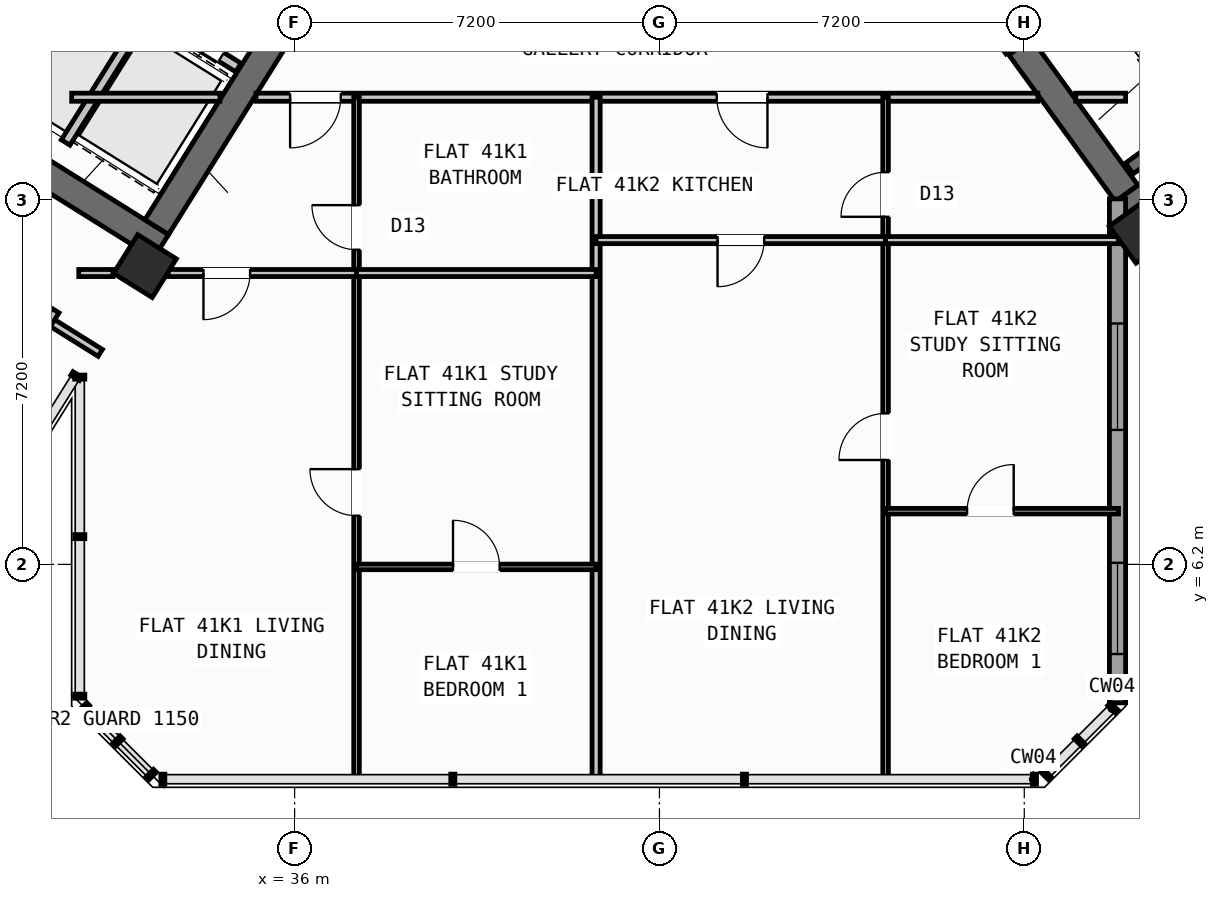
"""IFC4 building model, lengths in metres.
Left out: names, types, materials, properties, quantities, classifications, styles, units other than length and angle.
Written with IfcOpenShell. Run it as: python <this file> out.ifc"""

import sys

from ifc_helpers import new_model, si_unit, direction, frame, frame_2d, origin, origin_2d, place, context, subcontext, project, spatial, rectangle, hollow_rectangle, extrude, source, transform, mapped, element, fill, save


model = new_model("IFC4")
c1 = context("Model", 3, precision=1e-05, world=origin(), true_north=direction((0.0, 1.0)))
c2 = subcontext(c1, "Body", "Model", "MODEL_VIEW")
j1 = project(units=[si_unit("LENGTHUNIT", "METRE"), si_unit("PLANEANGLEUNIT", "RADIAN")], contexts=[c1])
p1 = place(None, origin())
s1 = spatial("IfcSite", under=j1, at=p1, CompositionType="ELEMENT")
p2 = place(p1, origin())
s2 = spatial("IfcBuilding", under=s1, at=p2, CompositionType="ELEMENT")
p3 = place(p2, frame((0.0, 0.0, 162.3)))
s3 = spatial("IfcBuildingStorey", under=s2, at=p3, CompositionType="ELEMENT", Elevation=162.3)
p4 = place(p3, frame((33.366, 12.477, 0.0), z_axis=(0.0, 0.0, 1.0), x_axis=(-0.848047359947, 0.529920442413, 0.0)))
e1 = element("IfcWall", 1, at=p4, inside=s3, PredefinedType="SHEAR", context=c2, shape_type="SweptSolid", body=[
    extrude(rectangle(XDim=13.14, YDim=0.55, at=frame_2d((6.57, 0.0))), origin(), (0.0, 0.0, 1.0), 3.35),
])
p5 = place(p3, frame((36.683, 18.304, 0.0), z_axis=(0.0, 0.0, 1.0), x_axis=(-0.529896466841, -0.848062341122, 0.0)))
e2 = element("IfcWall", 2, at=p5, inside=s3, PredefinedType="SHEAR", context=c2, shape_type="SweptSolid", body=[
    extrude(rectangle(XDim=6.425, YDim=0.55, at=frame_2d((3.212, 0.0))), origin(), (0.0, 0.0, 1.0), 3.35),
])
p6 = place(p3, frame((52.359, 13.14, 0.0), z_axis=(0.0, 0.0, 1.0), x_axis=(0.809014896919, 0.587788139183, 0.0)))
e3 = element("IfcWall", 3, at=p6, inside=s3, PredefinedType="SHEAR", context=c2, shape_type="SweptSolid", body=[
    extrude(rectangle(XDim=12.34, YDim=0.55, at=frame_2d((6.17, 0.0))), origin(), (0.0, 0.0, 1.0), 3.35),
])
p7 = place(p3, frame((52.42, 13.524, 0.0), z_axis=(0.0, 0.0, 1.0), x_axis=(-0.587802113096, 0.809004744015, 0.0)))
e4 = element("IfcWall", 4, at=p7, inside=s3, PredefinedType="SHEAR", context=c2, shape_type="SweptSolid", body=[
    extrude(rectangle(XDim=3.575, YDim=0.55, at=frame_2d((1.788, 0.0))), origin(), (0.0, 0.0, 1.0), 3.35),
])
m1 = source(origin(), c2, "Body", "SweptSolid", [
    extrude(hollow_rectangle(XDim=0.9, YDim=0.9, WallThickness=0.036, at=origin_2d()), origin(), (0.0, 0.0, 1.0), 3.6),
])
for number, where, z_axis, x_axis in (
    (5, (33.046, 12.087, 0.0), (0.0, 0.0, 1.0), (-0.848, 0.53, 0.0)),
    (6, (52.705, 12.773, 0.0), (0.0, 0.0, 1.0), (0.809, 0.588, 0.0)),
):
    element("IfcColumn", number, at=place(p3, frame(where, z_axis=z_axis, x_axis=x_axis)), inside=s3, PredefinedType="COLUMN", context=c2, shape_type="MappedRepresentation", body=[
        mapped(m1, transform((0.0, 0.0, 0.0), scale=1.0)),
    ])
p8 = place(p3, frame((56.581, 7.439, 0.0), z_axis=(0.0, 0.0, 1.0), x_axis=(-0.587771678454, 0.809026856172, 0.0)))
e7 = element("IfcWall", 7, at=p8, inside=s3, PredefinedType="STANDARD", context=c2, shape_type="SweptSolid", body=[
    extrude(rectangle(XDim=6.824, YDim=0.32, at=frame_2d((3.412, 0.0))), origin(), (0.0, 0.0, 1.0), 2.775),
])
p9 = place(p8, frame((1.531, 0.0, 0.8)))
e8 = element("IfcOpeningElement", 8, at=p9, cuts=e7, PredefinedType="OPENING", context=c2, shape_type="SweptSolid", body=[
    extrude(rectangle(XDim=2.1, YDim=1.55, at=frame_2d((1.05, 0.775))), frame((0.0, 0.17, 0.0), z_axis=(0.0, -1.0, 0.0), x_axis=(1.0, 0.0, 0.0)), (0.0, 0.0, 1.0), 0.34),
])
p10 = place(p3, frame((52.24, 13.414, 0.0), z_axis=(0.0, 0.0, 1.0), x_axis=(0.0, -1.0, 0.0)))
e9 = element("IfcWall", 9, at=p10, inside=s3, PredefinedType="STANDARD", context=c2, shape_type="SweptSolid", body=[
    extrude(rectangle(XDim=9.948, YDim=0.32, at=frame_2d((4.974, 0.0))), origin(), (0.0, 0.0, 1.0), 3.35),
])
p11 = place(p10, frame((2.46, 0.0, 0.8)))
e10 = element("IfcOpeningElement", 10, at=p11, cuts=e9, PredefinedType="OPENING", context=c2, shape_type="SweptSolid", body=[
    extrude(rectangle(XDim=2.1, YDim=1.55, at=frame_2d((1.05, 0.775))), frame((0.0, 0.17, 0.0), z_axis=(0.0, -1.0, 0.0), x_axis=(1.0, 0.0, 0.0)), (0.0, 0.0, 1.0), 0.34),
])
p12 = place(p10, frame((7.183, 0.0, 0.85)))
e11 = element("IfcOpeningElement", 11, at=p12, cuts=e9, PredefinedType="OPENING", context=c2, shape_type="SweptSolid", body=[
    extrude(rectangle(XDim=1.8, YDim=1.5, at=frame_2d((0.9, 0.75))), frame((0.0, 0.17, 0.0), z_axis=(0.0, -1.0, 0.0), x_axis=(1.0, 0.0, 0.0)), (0.0, 0.0, 1.0), 0.34),
])
p13 = place(p3, frame((31.288, 18.256, 0.0), z_axis=(0.0, 0.0, 1.0), x_axis=(-0.529943379326, -0.848033026897, 0.0)))
e12 = element("IfcWall", 12, at=p13, inside=s3, PredefinedType="SHEAR", context=c2, shape_type="SweptSolid", body=[
    extrude(rectangle(XDim=3.16, YDim=0.26, at=frame_2d((1.58, 0.0))), origin(), (0.0, 0.0, 1.0), 3.35),
])
p14 = place(p3, frame((34.891, 16.005, 0.0), z_axis=(0.0, 0.0, 1.0), x_axis=(-0.848062873452, 0.529895614884, 0.0)))
e13 = element("IfcWall", 13, at=p14, inside=s3, PredefinedType="STANDARD", context=c2, shape_type="SweptSolid", body=[
    extrude(rectangle(XDim=4.248, YDim=0.2, at=frame_2d((2.124, 0.0))), origin(), (0.0, 0.0, 1.0), 3.34),
])
p15 = place(p14, frame((0.398, 0.0, 0.0)))
e14 = element("IfcOpeningElement", 14, at=p15, cuts=e13, PredefinedType="OPENING", context=c2, shape_type="SweptSolid", body=[
    extrude(rectangle(XDim=1.3, YDim=2.2, at=frame_2d((0.65, 1.1))), frame((0.0, 0.11, 0.0), z_axis=(0.0, -1.0, 0.0), x_axis=(1.0, 0.0, 0.0)), (0.0, 0.0, 1.0), 0.22),
])
p16 = place(p14, frame((2.473, 0.0, 0.0)))
e15 = element("IfcOpeningElement", 15, at=p16, cuts=e13, PredefinedType="OPENING", context=c2, shape_type="SweptSolid", body=[
    extrude(rectangle(XDim=1.45, YDim=2.25, at=frame_2d((0.725, 1.125))), frame((0.0, 0.11, 0.0), z_axis=(0.0, -1.0, 0.0), x_axis=(1.0, 0.0, 0.0)), (0.0, 0.0, 1.0), 0.22),
])
p17 = place(p3, frame((33.029, 17.003, 0.0), z_axis=(0.0, 0.0, 1.0), x_axis=(-0.529916267533, -0.848049968695, 0.0)))
e16 = element("IfcWall", 16, at=p17, inside=s3, PredefinedType="STANDARD", context=c2, shape_type="SweptSolid", body=[
    extrude(rectangle(XDim=2.92, YDim=0.2, at=frame_2d((1.46, 0.0))), origin(), (0.0, 0.0, 1.0), 3.34),
])
p18 = place(p3, frame((52.472, 14.013, 0.0), z_axis=(0.0, 0.0, 1.0), x_axis=(0.809028366311, 0.587769599847, 0.0)))
e17 = element("IfcWall", 17, at=p18, inside=s3, PredefinedType="SHEAR", context=c2, shape_type="SweptSolid", body=[
    extrude(rectangle(XDim=7.33, YDim=0.26, at=frame_2d((3.665, 0.0))), origin(), (0.0, 0.0, 1.0), 3.35),
])
p19 = place(p3, frame((32.164, 10.374, 0.0), z_axis=(0.0, 0.0, 1.0), x_axis=(-0.848044107957, 0.529925646633, 0.0)))
e18 = element("IfcWall", 18, at=p19, inside=s3, PredefinedType="PARTITIONING", context=c2, shape_type="SweptSolid", body=[
    extrude(rectangle(XDim=15.57, YDim=0.16, at=frame_2d((7.785, 0.0))), origin(), (0.0, 0.0, 1.0), 3.34),
])
p20 = place(p19, frame((10.83, 0.0, 0.0)))
e19 = element("IfcOpeningElement", 19, at=p20, cuts=e18, PredefinedType="OPENING", context=c2, shape_type="SweptSolid", body=[
    extrude(rectangle(XDim=1.0, YDim=2.1, at=frame_2d((0.5, 1.05))), frame((0.0, 0.09, 0.0), z_axis=(0.0, -1.0, 0.0), x_axis=(1.0, 0.0, 0.0)), (0.0, 0.0, 1.0), 0.18),
])
p21 = place(p3, frame((31.282, 11.208, 0.0), z_axis=(0.0, 0.0, 1.0), x_axis=(-0.529938869374, -0.84803584519, 0.0)))
e20 = element("IfcWall", 20, at=p21, inside=s3, PredefinedType="PARTITIONING", context=c2, shape_type="SweptSolid", body=[
    extrude(rectangle(XDim=5.48, YDim=0.16, at=frame_2d((2.74, 0.0))), origin(), (0.0, 0.0, 1.0), 3.34),
])
p22 = place(p3, frame((31.6, 15.42, 0.0), z_axis=(0.0, 0.0, 1.0), x_axis=(1.0, 0.0, 0.0)))
e21 = element("IfcWall", 21, at=p22, inside=s3, PredefinedType="PARTITIONING", context=c2, shape_type="SweptSolid", body=[
    extrude(rectangle(XDim=2.925, YDim=0.16, at=frame_2d((1.462, 0.0))), origin(), (0.0, 0.0, 1.0), 3.34),
])
p23 = place(p3, frame((35.237, 15.42, 0.0), z_axis=(0.0, 0.0, 1.0), x_axis=(1.0, 0.0, 0.0)))
e22 = element("IfcWall", 22, at=p23, inside=s3, PredefinedType="PARTITIONING", context=c2, shape_type="SweptSolid", body=[
    extrude(rectangle(XDim=15.432, YDim=0.16, at=frame_2d((7.716, 0.0))), origin(), (0.0, 0.0, 1.0), 3.34),
])
p24 = place(p23, frame((0.674, 0.0, 0.0)))
e23 = element("IfcOpeningElement", 23, at=p24, cuts=e22, PredefinedType="OPENING", context=c2, shape_type="SweptSolid", body=[
    extrude(rectangle(XDim=1.0, YDim=2.1, at=frame_2d((0.5, 1.05))), frame((0.0, 0.09, 0.0), z_axis=(0.0, -1.0, 0.0), x_axis=(1.0, 0.0, 0.0)), (0.0, 0.0, 1.0), 0.18),
])
p25 = place(p23, frame((9.094, 0.0, 0.0)))
e24 = element("IfcOpeningElement", 24, at=p25, cuts=e22, PredefinedType="OPENING", context=c2, shape_type="SweptSolid", body=[
    extrude(rectangle(XDim=1.0, YDim=2.1, at=frame_2d((0.5, 1.05))), frame((0.0, 0.09, 0.0), z_axis=(0.0, -1.0, 0.0), x_axis=(1.0, 0.0, 0.0)), (0.0, 0.0, 1.0), 0.18),
])
p26 = place(p3, frame((51.416, 15.42, 0.0), z_axis=(0.0, 0.0, 1.0), x_axis=(1.0, 0.0, 0.0)))
e25 = element("IfcWall", 25, at=p26, inside=s3, PredefinedType="PARTITIONING", context=c2, shape_type="SweptSolid", body=[
    extrude(rectangle(XDim=0.984, YDim=0.16, at=frame_2d((0.492, 0.0))), origin(), (0.0, 0.0, 1.0), 3.34),
])
p27 = place(p3, frame((50.119, 16.333, 0.0), z_axis=(0.0, 0.0, 1.0), x_axis=(-0.587749856981, 0.809042709391, 0.0)))
e26 = element("IfcWall", 26, at=p27, inside=s3, PredefinedType="STANDARD", context=c2, shape_type="SweptSolid", body=[
    extrude(rectangle(XDim=2.96, YDim=0.2, at=frame_2d((1.48, 0.0))), origin(), (0.0, 0.0, 1.0), 3.34),
])
p28 = place(p27, frame((0.53, 0.0, 0.0)))
e27 = element("IfcOpeningElement", 27, at=p28, cuts=e26, PredefinedType="OPENING", context=c2, shape_type="SweptSolid", body=[
    extrude(rectangle(XDim=1.5, YDim=2.15, at=frame_2d((0.75, 1.075))), frame((0.0, 0.11, 0.0), z_axis=(0.0, -1.0, 0.0), x_axis=(1.0, 0.0, 0.0)), (0.0, 0.0, 1.0), 0.22),
])
p29 = place(p3, frame((41.95, 1.96, 0.0), z_axis=(0.0, 0.0, 1.0), x_axis=(0.0, 1.0, 0.0)))
e28 = element("IfcWall", 28, at=p29, inside=s3, PredefinedType="PARTITIONING", context=c2, shape_type="SweptSolid", body=[
    extrude(rectangle(XDim=13.46, YDim=0.16, at=frame_2d((6.73, 0.0))), origin(), (0.0, 0.0, 1.0), 3.34),
])
p30 = place(p3, frame((37.222, 1.96, 0.0), z_axis=(0.0, 0.0, 1.0), x_axis=(0.0, 1.0, 0.0)))
e29 = element("IfcWall", 29, at=p30, inside=s3, PredefinedType="PARTITIONING", context=c2, shape_type="SweptSolid", body=[
    extrude(rectangle(XDim=13.46, YDim=0.11, at=frame_2d((6.73, 0.0))), origin(), (0.0, 0.0, 1.0), 3.34),
])
p31 = place(p30, frame((5.2, 0.0, 0.0)))
e30 = element("IfcOpeningElement", 30, at=p31, cuts=e29, PredefinedType="OPENING", context=c2, shape_type="SweptSolid", body=[
    extrude(rectangle(XDim=0.92, YDim=2.08, at=frame_2d((0.46, 1.04))), frame((0.0, 0.065, 0.0), z_axis=(0.0, -1.0, 0.0), x_axis=(1.0, 0.0, 0.0)), (0.0, 0.0, 1.0), 0.13),
])
p32 = place(p30, frame((10.45, 0.0, 0.0)))
e31 = element("IfcOpeningElement", 31, at=p32, cuts=e29, PredefinedType="OPENING", context=c2, shape_type="SweptSolid", body=[
    extrude(rectangle(XDim=0.88, YDim=2.08, at=frame_2d((0.44, 1.04))), frame((0.0, 0.065, 0.0), z_axis=(0.0, -1.0, 0.0), x_axis=(1.0, 0.0, 0.0)), (0.0, 0.0, 1.0), 0.13),
])
p33 = place(p3, frame((31.74, 11.95, 0.0), z_axis=(0.0, 0.0, 1.0), x_axis=(1.0, 0.0, 0.0)))
e32 = element("IfcWall", 32, at=p33, inside=s3, PredefinedType="PLUMBINGWALL", context=c2, shape_type="SweptSolid", body=[
    extrude(rectangle(XDim=0.676, YDim=0.14, at=frame_2d((0.338, 0.0))), origin(), (0.0, 0.0, 1.0), 3.34),
])
p34 = place(p3, frame((33.505, 11.95, 0.0), z_axis=(0.0, 0.0, 1.0), x_axis=(1.0, 0.0, 0.0)))
e33 = element("IfcWall", 33, at=p34, inside=s3, PredefinedType="PLUMBINGWALL", context=c2, shape_type="SweptSolid", body=[
    extrude(rectangle(XDim=3.717, YDim=0.14, at=frame_2d((1.858, 0.0))), origin(), (0.0, 0.0, 1.0), 2.525),
])
p35 = place(p34, frame((0.696, 0.0, 0.0)))
e34 = element("IfcOpeningElement", 34, at=p35, cuts=e33, PredefinedType="OPENING", context=c2, shape_type="SweptSolid", body=[
    extrude(rectangle(XDim=0.92, YDim=2.08, at=frame_2d((0.46, 1.04))), frame((0.0, 0.08, 0.0), z_axis=(0.0, -1.0, 0.0), x_axis=(1.0, 0.0, 0.0)), (0.0, 0.0, 1.0), 0.16),
])
p36 = place(p3, frame((37.222, 11.95, 0.0), z_axis=(0.0, 0.0, 1.0), x_axis=(1.0, 0.0, 0.0)))
e35 = element("IfcWall", 35, at=p36, inside=s3, PredefinedType="PLUMBINGWALL", context=c2, shape_type="SweptSolid", body=[
    extrude(rectangle(XDim=4.728, YDim=0.14, at=frame_2d((2.364, 0.0))), origin(), (0.0, 0.0, 1.0), 2.525),
])
p37 = place(p3, frame((37.222, 6.15, 0.0), z_axis=(0.0, 0.0, 1.0), x_axis=(1.0, 0.0, 0.0)))
e36 = element("IfcWall", 36, at=p37, inside=s3, PredefinedType="PARTITIONING", context=c2, shape_type="SweptSolid", body=[
    extrude(rectangle(XDim=4.728, YDim=0.11, at=frame_2d((2.364, 0.0))), origin(), (0.0, 0.0, 1.0), 3.34),
])
p38 = place(p37, frame((1.904, 0.0, 0.0)))
e37 = element("IfcOpeningElement", 37, at=p38, cuts=e36, PredefinedType="OPENING", context=c2, shape_type="SweptSolid", body=[
    extrude(rectangle(XDim=0.92, YDim=2.08, at=frame_2d((0.46, 1.04))), frame((0.0, 0.065, 0.0), z_axis=(0.0, -1.0, 0.0), x_axis=(1.0, 0.0, 0.0)), (0.0, 0.0, 1.0), 0.13),
])
p39 = place(p3, frame((47.663, 1.96, 0.0), z_axis=(0.0, 0.0, 1.0), x_axis=(0.0, 1.0, 0.0)))
e38 = element("IfcWall", 38, at=p39, inside=s3, PredefinedType="PARTITIONING", context=c2, shape_type="SweptSolid", body=[
    extrude(rectangle(XDim=13.46, YDim=0.11, at=frame_2d((6.73, 0.0))), origin(), (0.0, 0.0, 1.0), 3.34),
])
p40 = place(p39, frame((6.3, 0.0, 0.0)))
e39 = element("IfcOpeningElement", 39, at=p40, cuts=e38, PredefinedType="OPENING", context=c2, shape_type="SweptSolid", body=[
    extrude(rectangle(XDim=0.92, YDim=2.08, at=frame_2d((0.46, 1.04))), frame((0.0, 0.065, 0.0), z_axis=(0.0, -1.0, 0.0), x_axis=(1.0, 0.0, 0.0)), (0.0, 0.0, 1.0), 0.13),
])
p41 = place(p39, frame((11.1, 0.0, 0.0)))
e40 = element("IfcOpeningElement", 40, at=p41, cuts=e38, PredefinedType="OPENING", context=c2, shape_type="SweptSolid", body=[
    extrude(rectangle(XDim=0.88, YDim=2.08, at=frame_2d((0.44, 1.04))), frame((0.0, 0.065, 0.0), z_axis=(0.0, -1.0, 0.0), x_axis=(1.0, 0.0, 0.0)), (0.0, 0.0, 1.0), 0.13),
])
p42 = place(p3, frame((41.95, 12.6, 0.0), z_axis=(0.0, 0.0, 1.0), x_axis=(1.0, 0.0, 0.0)))
e41 = element("IfcWall", 41, at=p42, inside=s3, PredefinedType="PLUMBINGWALL", context=c2, shape_type="SweptSolid", body=[
    extrude(rectangle(XDim=5.713, YDim=0.14, at=frame_2d((2.856, 0.0))), origin(), (0.0, 0.0, 1.0), 2.525),
])
p43 = place(p42, frame((2.396, 0.0, 0.0)))
e42 = element("IfcOpeningElement", 42, at=p43, cuts=e41, PredefinedType="OPENING", context=c2, shape_type="SweptSolid", body=[
    extrude(rectangle(XDim=0.92, YDim=2.08, at=frame_2d((0.46, 1.04))), frame((0.0, 0.08, 0.0), z_axis=(0.0, -1.0, 0.0), x_axis=(1.0, 0.0, 0.0)), (0.0, 0.0, 1.0), 0.16),
])
p44 = place(p3, frame((47.663, 12.6, 0.0), z_axis=(0.0, 0.0, 1.0), x_axis=(1.0, 0.0, 0.0)))
e43 = element("IfcWall", 43, at=p44, inside=s3, PredefinedType="PLUMBINGWALL", context=c2, shape_type="SweptSolid", body=[
    extrude(rectangle(XDim=4.597, YDim=0.14, at=frame_2d((2.298, 0.0))), origin(), (0.0, 0.0, 1.0), 2.525),
])
p45 = place(p3, frame((47.663, 7.25, 0.0), z_axis=(0.0, 0.0, 1.0), x_axis=(1.0, 0.0, 0.0)))
e44 = element("IfcWall", 44, at=p45, inside=s3, PredefinedType="PARTITIONING", context=c2, shape_type="SweptSolid", body=[
    extrude(rectangle(XDim=4.597, YDim=0.11, at=frame_2d((2.298, 0.0))), origin(), (0.0, 0.0, 1.0), 3.34),
])
p46 = place(p45, frame((1.608, 0.0, 0.0)))
e45 = element("IfcOpeningElement", 45, at=p46, cuts=e44, PredefinedType="OPENING", context=c2, shape_type="SweptSolid", body=[
    extrude(rectangle(XDim=0.92, YDim=2.08, at=frame_2d((0.46, 1.04))), frame((0.0, 0.065, 0.0), z_axis=(0.0, -1.0, 0.0), x_axis=(1.0, 0.0, 0.0)), (0.0, 0.0, 1.0), 0.13),
])
m2 = source(origin(), c2, "Body", "SweptSolid", [
    extrude(rectangle(XDim=2.1, YDim=1.55, at=frame_2d((1.05, 0.775))), frame((0.0, 0.03, 0.0), z_axis=(0.0, -1.0, 0.0), x_axis=(1.0, 0.0, 0.0)), (0.0, 0.0, 1.0), 0.06),
])
p47 = place(p11, origin())
e46 = element("IfcWindow", 46, at=p47, inside=s3, PartitioningType="SINGLE_PANEL", PredefinedType="WINDOW", context=c2, shape_type="MappedRepresentation", body=[
    mapped(m2, transform((0.0, 0.0, 0.0), scale=1.0)),
])
fill(e10, e46)
m3 = source(origin(), c2, "Body", "SweptSolid", [
    extrude(rectangle(XDim=1.8, YDim=1.5, at=frame_2d((0.9, 0.75))), frame((0.0, 0.03, 0.0), z_axis=(0.0, -1.0, 0.0), x_axis=(1.0, 0.0, 0.0)), (0.0, 0.0, 1.0), 0.06),
])
p48 = place(p12, origin())
e47 = element("IfcWindow", 47, at=p48, inside=s3, PartitioningType="SINGLE_PANEL", PredefinedType="WINDOW", context=c2, shape_type="MappedRepresentation", body=[
    mapped(m3, transform((0.0, 0.0, 0.0), scale=1.0)),
])
fill(e11, e47)
m4 = source(origin(), c2, "Body", "SweptSolid", [
    extrude(rectangle(XDim=1.3, YDim=2.2, at=frame_2d((0.65, 1.1))), frame((0.0, 0.025, 0.0), z_axis=(0.0, -1.0, 0.0), x_axis=(1.0, 0.0, 0.0)), (0.0, 0.0, 1.0), 0.05),
])
p49 = place(p15, origin())
e48 = element("IfcDoor", 48, at=p49, inside=s3, OperationType="DOUBLE_DOOR_SLIDING", PredefinedType="DOOR", context=c2, shape_type="MappedRepresentation", body=[
    mapped(m4, transform((0.0, 0.0, 0.0), scale=1.0)),
])
fill(e14, e48)
m5 = source(origin(), c2, "Body", "SweptSolid", [
    extrude(rectangle(XDim=0.92, YDim=2.08, at=frame_2d((0.46, 1.04))), frame((0.0, 0.025, 0.0), z_axis=(0.0, -1.0, 0.0), x_axis=(1.0, 0.0, 0.0)), (0.0, 0.0, 1.0), 0.05),
])
p50 = place(p31, origin())
e49 = element("IfcDoor", 49, at=p50, inside=s3, OperationType="SINGLE_SWING_RIGHT", PredefinedType="DOOR", context=c2, shape_type="MappedRepresentation", body=[
    mapped(m5, transform((0.0, 0.0, 0.0), scale=1.0)),
])
fill(e30, e49)
p51 = place(p38, origin())
e50 = element("IfcDoor", 50, at=p51, inside=s3, OperationType="SINGLE_SWING_LEFT", PredefinedType="DOOR", context=c2, shape_type="MappedRepresentation", body=[
    mapped(m5, transform((0.0, 0.0, 0.0), scale=1.0)),
])
fill(e37, e50)
m6 = source(origin(), c2, "Body", "SweptSolid", [
    extrude(rectangle(XDim=1.0, YDim=2.1, at=frame_2d((0.5, 1.05))), frame((0.0, 0.025, 0.0), z_axis=(0.0, -1.0, 0.0), x_axis=(1.0, 0.0, 0.0)), (0.0, 0.0, 1.0), 0.05),
])
p52 = place(p24, frame((1.0, 0.0, 0.0), z_axis=(0.0, 0.0, 1.0), x_axis=(-1.0, 0.0, 0.0)))
e51 = element("IfcDoor", 51, at=p52, inside=s3, OperationType="SINGLE_SWING_RIGHT", PredefinedType="DOOR", context=c2, shape_type="MappedRepresentation", body=[
    mapped(m6, transform((0.0, 0.0, 0.0), scale=1.0)),
])
fill(e23, e51)
p53 = place(p35, frame((0.92, 0.0, 0.0), z_axis=(0.0, 0.0, 1.0), x_axis=(-1.0, 0.0, 0.0)))
e52 = element("IfcDoor", 52, at=p53, inside=s3, OperationType="SINGLE_SWING_RIGHT", PredefinedType="DOOR", context=c2, shape_type="MappedRepresentation", body=[
    mapped(m5, transform((0.0, 0.0, 0.0), scale=1.0)),
])
fill(e34, e52)
m7 = source(origin(), c2, "Body", "SweptSolid", [
    extrude(rectangle(XDim=0.88, YDim=2.08, at=frame_2d((0.44, 1.04))), frame((0.0, 0.025, 0.0), z_axis=(0.0, -1.0, 0.0), x_axis=(1.0, 0.0, 0.0)), (0.0, 0.0, 1.0), 0.05),
])
p54 = place(p32, origin())
e53 = element("IfcDoor", 53, at=p54, inside=s3, OperationType="SINGLE_SWING_RIGHT", PredefinedType="DOOR", context=c2, shape_type="MappedRepresentation", body=[
    mapped(m7, transform((0.0, 0.0, 0.0), scale=1.0)),
])
fill(e31, e53)
p55 = place(p40, origin())
e54 = element("IfcDoor", 54, at=p55, inside=s3, OperationType="SINGLE_SWING_LEFT", PredefinedType="DOOR", context=c2, shape_type="MappedRepresentation", body=[
    mapped(m5, transform((0.0, 0.0, 0.0), scale=1.0)),
])
fill(e39, e54)
p56 = place(p46, origin())
e55 = element("IfcDoor", 55, at=p56, inside=s3, OperationType="SINGLE_SWING_RIGHT", PredefinedType="DOOR", context=c2, shape_type="MappedRepresentation", body=[
    mapped(m5, transform((0.0, 0.0, 0.0), scale=1.0)),
])
fill(e45, e55)
p57 = place(p25, frame((1.0, 0.0, 0.0), z_axis=(0.0, 0.0, 1.0), x_axis=(-1.0, 0.0, 0.0)))
e56 = element("IfcDoor", 56, at=p57, inside=s3, OperationType="SINGLE_SWING_LEFT", PredefinedType="DOOR", context=c2, shape_type="MappedRepresentation", body=[
    mapped(m6, transform((0.0, 0.0, 0.0), scale=1.0)),
])
fill(e24, e56)
p58 = place(p43, frame((0.92, 0.0, 0.0), z_axis=(0.0, 0.0, 1.0), x_axis=(-1.0, 0.0, 0.0)))
e57 = element("IfcDoor", 57, at=p58, inside=s3, OperationType="SINGLE_SWING_RIGHT", PredefinedType="DOOR", context=c2, shape_type="MappedRepresentation", body=[
    mapped(m5, transform((0.0, 0.0, 0.0), scale=1.0)),
])
fill(e42, e57)
p59 = place(p41, origin())
e58 = element("IfcDoor", 58, at=p59, inside=s3, OperationType="SINGLE_SWING_LEFT", PredefinedType="DOOR", context=c2, shape_type="MappedRepresentation", body=[
    mapped(m7, transform((0.0, 0.0, 0.0), scale=1.0)),
])
fill(e40, e58)
save(model, sys.argv[1])
